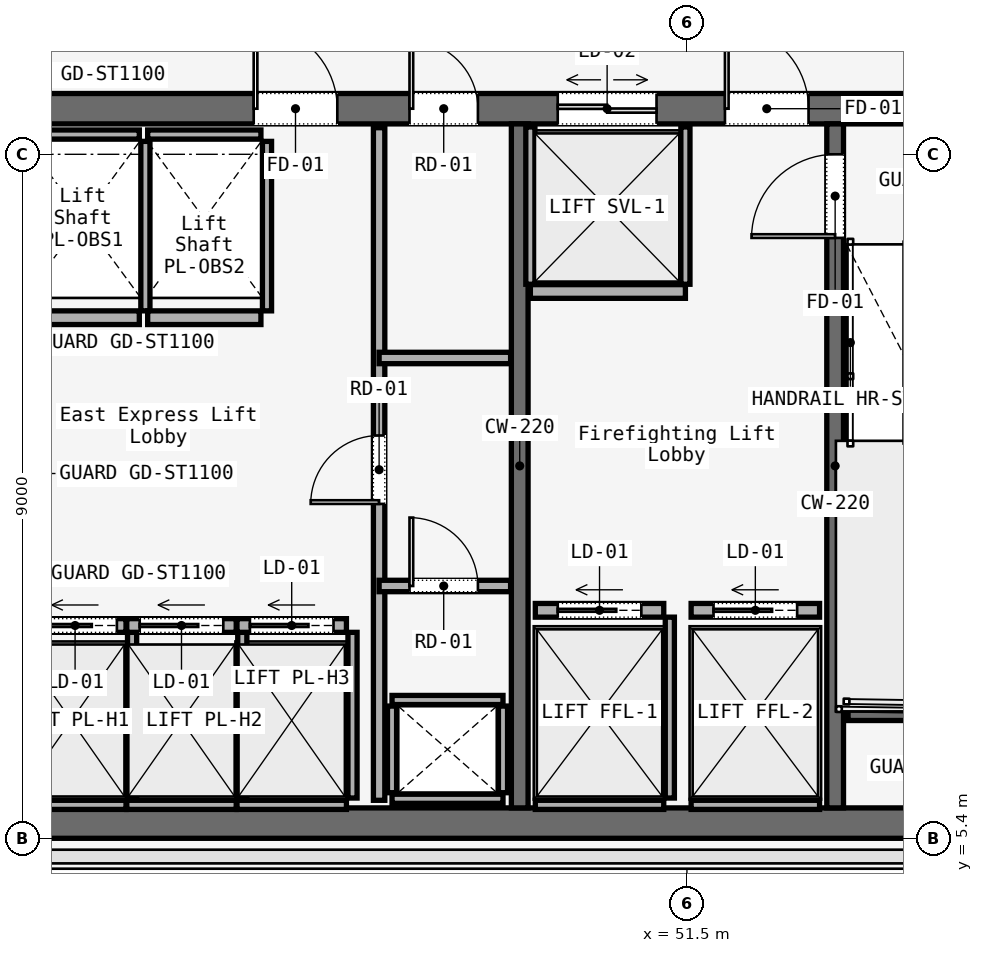
"""IFC4 building model, lengths in metres.
Left out: names, types, materials, properties, quantities, classifications, styles, units other than length and angle.
Written with IfcOpenShell. Run it as: python <this file> out.ifc"""

import sys

from ifc_helpers import new_model, si_unit, direction, frame, frame_2d, origin, place, context, subcontext, project, spatial, rectangle, extrude, element, fill, save


model = new_model("IFC4")
c1 = context("Model", 3, precision=1e-05, world=origin(), true_north=direction((0.0, 1.0)))
c2 = subcontext(c1, "Body", "Model", "MODEL_VIEW")
j1 = project(units=[si_unit("LENGTHUNIT", "METRE"), si_unit("PLANEANGLEUNIT", "RADIAN")], contexts=[c1])
p1 = place(None, origin())
s1 = spatial("IfcSite", under=j1, at=p1, CompositionType="ELEMENT")
p2 = place(p1, origin())
s2 = spatial("IfcBuilding", under=s1, at=p2, CompositionType="ELEMENT")
p3 = place(p2, frame((0.0, 0.0, 275.0)))
s3 = spatial("IfcBuildingStorey", under=s2, at=p3, CompositionType="ELEMENT", Elevation=275.0)
p4 = place(p3, frame((26.45, 15.0, 0.0), z_axis=(0.0, 0.0, 1.0), x_axis=(1.0, 0.0, 0.0)))
e1 = element("IfcWall", 1, at=p4, inside=s3, PredefinedType="SOLIDWALL", context=c2, shape_type="SweptSolid", body=[
    extrude(rectangle(XDim=31.1, YDim=0.4, at=frame_2d((15.55, 0.0))), origin(), (0.0, 0.0, 1.0), 3.52),
])
p5 = place(p4, frame((1.65, 0.0, 0.0)))
e2 = element("IfcOpeningElement", 2, at=p5, cuts=e1, PredefinedType="OPENING", context=c2, shape_type="SweptSolid", body=[
    extrude(rectangle(XDim=1.1, YDim=2.2, at=frame_2d((0.55, 1.1))), frame((0.0, 0.2, 0.0), z_axis=(0.0, -1.0, 0.0), x_axis=(1.0, 0.0, 0.0)), (0.0, 0.0, 1.0), 0.4),
])
p6 = place(p4, frame((13.65, 0.0, 0.0)))
e3 = element("IfcOpeningElement", 3, at=p6, cuts=e1, PredefinedType="OPENING", context=c2, shape_type="SweptSolid", body=[
    extrude(rectangle(XDim=1.1, YDim=2.2, at=frame_2d((0.55, 1.1))), frame((0.0, 0.2, 0.0), z_axis=(0.0, -1.0, 0.0), x_axis=(1.0, 0.0, 0.0)), (0.0, 0.0, 1.0), 0.4),
])
p7 = place(p4, frame((25.55, 0.0, 0.0)))
e4 = element("IfcOpeningElement", 4, at=p7, cuts=e1, PredefinedType="OPENING", context=c2, shape_type="SweptSolid", body=[
    extrude(rectangle(XDim=1.1, YDim=2.2, at=frame_2d((0.55, 1.1))), frame((0.0, 0.2, 0.0), z_axis=(0.0, -1.0, 0.0), x_axis=(1.0, 0.0, 0.0)), (0.0, 0.0, 1.0), 0.4),
])
p8 = place(p4, frame((19.35, 0.0, 0.0)))
e5 = element("IfcOpeningElement", 5, at=p8, cuts=e1, PredefinedType="OPENING", context=c2, shape_type="SweptSolid", body=[
    extrude(rectangle(XDim=1.1, YDim=2.2, at=frame_2d((0.55, 1.1))), frame((0.0, 0.2, 0.0), z_axis=(0.0, -1.0, 0.0), x_axis=(1.0, 0.0, 0.0)), (0.0, 0.0, 1.0), 0.4),
])
p9 = place(p4, frame((21.4, 0.0, 0.0)))
e6 = element("IfcOpeningElement", 6, at=p9, cuts=e1, PredefinedType="OPENING", context=c2, shape_type="SweptSolid", body=[
    extrude(rectangle(XDim=0.9, YDim=2.1, at=frame_2d((0.45, 1.05))), frame((0.0, 0.2, 0.0), z_axis=(0.0, -1.0, 0.0), x_axis=(1.0, 0.0, 0.0)), (0.0, 0.0, 1.0), 0.4),
])
p10 = place(p4, frame((5.54, 0.0, 0.0)))
e7 = element("IfcOpeningElement", 7, at=p10, cuts=e1, PredefinedType="OPENING", context=c2, shape_type="SweptSolid", body=[
    extrude(rectangle(XDim=0.95, YDim=2.2, at=frame_2d((0.475, 1.1))), frame((0.0, 0.2, 0.0), z_axis=(0.0, -1.0, 0.0), x_axis=(1.0, 0.0, 0.0)), (0.0, 0.0, 1.0), 0.4),
])
p11 = place(p4, frame((9.49, 0.0, 0.0)))
e8 = element("IfcOpeningElement", 8, at=p11, cuts=e1, PredefinedType="OPENING", context=c2, shape_type="SweptSolid", body=[
    extrude(rectangle(XDim=0.95, YDim=2.2, at=frame_2d((0.475, 1.1))), frame((0.0, 0.2, 0.0), z_axis=(0.0, -1.0, 0.0), x_axis=(1.0, 0.0, 0.0)), (0.0, 0.0, 1.0), 0.4),
])
p12 = place(p4, frame((23.35, 0.0, 0.0)))
e9 = element("IfcOpeningElement", 9, at=p12, cuts=e1, PredefinedType="OPENING", context=c2, shape_type="SweptSolid", body=[
    extrude(rectangle(XDim=1.3, YDim=2.3, at=frame_2d((0.65, 1.15))), frame((0.0, 0.2, 0.0), z_axis=(0.0, -1.0, 0.0), x_axis=(1.0, 0.0, 0.0)), (0.0, 0.0, 1.0), 0.4),
])
p13 = place(p3, frame((26.45, 5.6, 0.0), z_axis=(0.0, 0.0, 1.0), x_axis=(1.0, 0.0, 0.0)))
e10 = element("IfcWall", 10, at=p13, inside=s3, PredefinedType="SOLIDWALL", context=c2, shape_type="SweptSolid", body=[
    extrude(rectangle(XDim=31.1, YDim=0.4, at=frame_2d((15.55, 0.0))), origin(), (0.0, 0.0, 1.0), 3.52),
])
p14 = place(p3, frame((49.3, 5.8, 0.0), z_axis=(0.0, 0.0, 1.0), x_axis=(0.0, 1.0, 0.0)))
e11 = element("IfcWall", 11, at=p14, inside=s3, PredefinedType="SOLIDWALL", context=c2, shape_type="SweptSolid", body=[
    extrude(rectangle(XDim=9.0, YDim=0.22, at=frame_2d((4.5, 0.0))), origin(), (0.0, 0.0, 1.0), 3.52),
])
p15 = place(p3, frame((53.45, 5.8, 0.0), z_axis=(0.0, 0.0, 1.0), x_axis=(0.0, 1.0, 0.0)))
e12 = element("IfcWall", 12, at=p15, inside=s3, PredefinedType="SOLIDWALL", context=c2, shape_type="SweptSolid", body=[
    extrude(rectangle(XDim=9.0, YDim=0.22, at=frame_2d((4.5, 0.0))), origin(), (0.0, 0.0, 1.0), 3.52),
])
p16 = place(p15, frame((7.5, 0.0, 0.0)))
e13 = element("IfcOpeningElement", 13, at=p16, cuts=e12, PredefinedType="OPENING", context=c2, shape_type="SweptSolid", body=[
    extrude(rectangle(XDim=1.1, YDim=2.2, at=frame_2d((0.55, 1.1))), frame((0.0, 0.11, 0.0), z_axis=(0.0, -1.0, 0.0), x_axis=(1.0, 0.0, 0.0)), (0.0, 0.0, 1.0), 0.22),
])
p17 = place(p3, frame((53.62, 7.05, 0.0), z_axis=(0.0, 0.0, 1.0), x_axis=(1.0, 0.0, 0.0)))
e14 = element("IfcWall", 14, at=p17, inside=s3, PredefinedType="SOLIDWALL", context=c2, shape_type="SweptSolid", body=[
    extrude(rectangle(XDim=3.115, YDim=0.2, at=frame_2d((1.558, 0.0))), origin(), (0.0, 0.0, 1.0), 3.8),
])
for number, where, z_axis, x_axis in (
    (15, (47.62, 5.92, 0.0), (0.0, 0.0, 1.0), (1.0, 0.0, 0.0)),
    (16, (47.62, 7.22, 0.0), (0.0, 0.0, 1.0), (1.0, 0.0, 0.0)),
):
    element("IfcWall", number, at=place(p3, frame(where, z_axis=z_axis, x_axis=x_axis)), inside=s3, PredefinedType="SOLIDWALL", context=c2, shape_type="SweptSolid", body=[
        extrude(rectangle(XDim=1.46, YDim=0.12, at=frame_2d((0.73, 0.0))), origin(), (0.0, 0.0, 1.0), 2.95),
    ])
for number, where, z_axis, x_axis in (
    (17, (47.62, 6.0, 0.0), (0.0, 0.0, 1.0), (0.0, 1.0, 0.0)),
    (18, (49.08, 6.0, 0.0), (0.0, 0.0, 1.0), (0.0, 1.0, 0.0)),
):
    element("IfcWall", number, at=place(p3, frame(where, z_axis=z_axis, x_axis=x_axis)), inside=s3, PredefinedType="SOLIDWALL", context=c2, shape_type="SweptSolid", body=[
        extrude(rectangle(XDim=1.14, YDim=0.12, at=frame_2d((0.57, 0.0))), origin(), (0.0, 0.0, 1.0), 2.95),
    ])
p18 = place(p3, frame((47.45, 5.9, 0.0), z_axis=(0.0, 0.0, 1.0), x_axis=(0.0, 1.0, 0.0)))
e19 = element("IfcWall", 19, at=p18, inside=s3, PredefinedType="PARTITIONING", context=c2, shape_type="SweptSolid", body=[
    extrude(rectangle(XDim=8.85, YDim=0.15, at=frame_2d((4.425, 0.0))), origin(), (0.0, 0.0, 1.0), 2.95),
])
p19 = place(p18, frame((3.9, 0.0, 0.0)))
e20 = element("IfcOpeningElement", 20, at=p19, cuts=e19, PredefinedType="OPENING", context=c2, shape_type="SweptSolid", body=[
    extrude(rectangle(XDim=0.9, YDim=2.1, at=frame_2d((0.45, 1.05))), frame((0.0, 0.075, 0.0), z_axis=(0.0, -1.0, 0.0), x_axis=(1.0, 0.0, 0.0)), (0.0, 0.0, 1.0), 0.15),
])
p20 = place(p3, frame((47.45, 8.72, 0.0), z_axis=(0.0, 0.0, 1.0), x_axis=(1.0, 0.0, 0.0)))
e21 = element("IfcWall", 21, at=p20, inside=s3, PredefinedType="PARTITIONING", context=c2, shape_type="SweptSolid", body=[
    extrude(rectangle(XDim=1.73, YDim=0.15, at=frame_2d((0.865, 0.0))), origin(), (0.0, 0.0, 1.0), 2.95),
])
p21 = place(p20, frame((0.4, 0.0, 0.0)))
e22 = element("IfcOpeningElement", 22, at=p21, cuts=e21, PredefinedType="OPENING", context=c2, shape_type="SweptSolid", body=[
    extrude(rectangle(XDim=0.9, YDim=2.1, at=frame_2d((0.45, 1.05))), frame((0.0, 0.075, 0.0), z_axis=(0.0, -1.0, 0.0), x_axis=(1.0, 0.0, 0.0)), (0.0, 0.0, 1.0), 0.15),
])
p22 = place(p3, frame((47.45, 11.72, 0.0), z_axis=(0.0, 0.0, 1.0), x_axis=(1.0, 0.0, 0.0)))
e23 = element("IfcWall", 23, at=p22, inside=s3, PredefinedType="PARTITIONING", context=c2, shape_type="SweptSolid", body=[
    extrude(rectangle(XDim=1.73, YDim=0.15, at=frame_2d((0.865, 0.0))), origin(), (0.0, 0.0, 1.0), 2.95),
])
p23 = place(p3, frame((42.78, 8.2, 0.0), z_axis=(0.0, 0.0, 1.0), x_axis=(1.0, 0.0, 0.0)))
e24 = element("IfcWall", 24, at=p23, inside=s3, PredefinedType="SOLIDWALL", context=c2, shape_type="SweptSolid", body=[
    extrude(rectangle(XDim=1.34, YDim=0.18, at=frame_2d((0.67, 0.0))), origin(), (0.0, 0.0, 1.0), 2.95),
])
p24 = place(p23, frame((0.12, 0.0, 0.0)))
e25 = element("IfcOpeningElement", 25, at=p24, cuts=e24, PredefinedType="OPENING", context=c2, shape_type="SweptSolid", body=[
    extrude(rectangle(XDim=1.1, YDim=2.2, at=frame_2d((0.55, 1.1))), frame((0.0, 0.09, 0.0), z_axis=(0.0, -1.0, 0.0), x_axis=(1.0, 0.0, 0.0)), (0.0, 0.0, 1.0), 0.18),
])
p25 = place(p3, frame((42.78, 5.84, 0.0), z_axis=(0.0, 0.0, 1.0), x_axis=(1.0, 0.0, 0.0)))
e26 = element("IfcWall", 26, at=p25, inside=s3, PredefinedType="SOLIDWALL", context=c2, shape_type="SweptSolid", body=[
    extrude(rectangle(XDim=1.34, YDim=0.12, at=frame_2d((0.67, 0.0))), origin(), (0.0, 0.0, 1.0), 2.95),
])
p26 = place(p3, frame((44.2, 5.93, 0.0), z_axis=(0.0, 0.0, 1.0), x_axis=(0.0, 1.0, 0.0)))
e27 = element("IfcWall", 27, at=p26, inside=s3, PredefinedType="SOLIDWALL", context=c2, shape_type="SweptSolid", body=[
    extrude(rectangle(XDim=2.18, YDim=0.12, at=frame_2d((1.09, 0.0))), origin(), (0.0, 0.0, 1.0), 2.95),
])
p27 = place(p3, frame((44.13, 8.2, 0.0), z_axis=(0.0, 0.0, 1.0), x_axis=(1.0, 0.0, 0.0)))
e28 = element("IfcWall", 28, at=p27, inside=s3, PredefinedType="SOLIDWALL", context=c2, shape_type="SweptSolid", body=[
    extrude(rectangle(XDim=1.44, YDim=0.18, at=frame_2d((0.72, 0.0))), origin(), (0.0, 0.0, 1.0), 2.95),
])
p28 = place(p27, frame((0.17, 0.0, 0.0)))
e29 = element("IfcOpeningElement", 29, at=p28, cuts=e28, PredefinedType="OPENING", context=c2, shape_type="SweptSolid", body=[
    extrude(rectangle(XDim=1.1, YDim=2.2, at=frame_2d((0.55, 1.1))), frame((0.0, 0.09, 0.0), z_axis=(0.0, -1.0, 0.0), x_axis=(1.0, 0.0, 0.0)), (0.0, 0.0, 1.0), 0.18),
])
p29 = place(p3, frame((44.13, 5.84, 0.0), z_axis=(0.0, 0.0, 1.0), x_axis=(1.0, 0.0, 0.0)))
e30 = element("IfcWall", 30, at=p29, inside=s3, PredefinedType="SOLIDWALL", context=c2, shape_type="SweptSolid", body=[
    extrude(rectangle(XDim=1.44, YDim=0.12, at=frame_2d((0.72, 0.0))), origin(), (0.0, 0.0, 1.0), 2.95),
])
p30 = place(p3, frame((45.65, 5.93, 0.0), z_axis=(0.0, 0.0, 1.0), x_axis=(0.0, 1.0, 0.0)))
e31 = element("IfcWall", 31, at=p30, inside=s3, PredefinedType="SOLIDWALL", context=c2, shape_type="SweptSolid", body=[
    extrude(rectangle(XDim=2.18, YDim=0.12, at=frame_2d((1.09, 0.0))), origin(), (0.0, 0.0, 1.0), 2.95),
])
p31 = place(p3, frame((45.58, 8.2, 0.0), z_axis=(0.0, 0.0, 1.0), x_axis=(1.0, 0.0, 0.0)))
e32 = element("IfcWall", 32, at=p31, inside=s3, PredefinedType="SOLIDWALL", context=c2, shape_type="SweptSolid", body=[
    extrude(rectangle(XDim=1.44, YDim=0.18, at=frame_2d((0.72, 0.0))), origin(), (0.0, 0.0, 1.0), 2.95),
])
p32 = place(p31, frame((0.17, 0.0, 0.0)))
e33 = element("IfcOpeningElement", 33, at=p32, cuts=e32, PredefinedType="OPENING", context=c2, shape_type="SweptSolid", body=[
    extrude(rectangle(XDim=1.1, YDim=2.2, at=frame_2d((0.55, 1.1))), frame((0.0, 0.09, 0.0), z_axis=(0.0, -1.0, 0.0), x_axis=(1.0, 0.0, 0.0)), (0.0, 0.0, 1.0), 0.18),
])
p33 = place(p3, frame((45.58, 5.84, 0.0), z_axis=(0.0, 0.0, 1.0), x_axis=(1.0, 0.0, 0.0)))
e34 = element("IfcWall", 34, at=p33, inside=s3, PredefinedType="SOLIDWALL", context=c2, shape_type="SweptSolid", body=[
    extrude(rectangle(XDim=1.44, YDim=0.12, at=frame_2d((0.72, 0.0))), origin(), (0.0, 0.0, 1.0), 2.95),
])
p34 = place(p3, frame((47.1, 5.93, 0.0), z_axis=(0.0, 0.0, 1.0), x_axis=(0.0, 1.0, 0.0)))
e35 = element("IfcWall", 35, at=p34, inside=s3, PredefinedType="SOLIDWALL", context=c2, shape_type="SweptSolid", body=[
    extrude(rectangle(XDim=2.18, YDim=0.12, at=frame_2d((1.09, 0.0))), origin(), (0.0, 0.0, 1.0), 2.95),
])
p35 = place(p3, frame((42.805, 12.25, 0.0), z_axis=(0.0, 0.0, 1.0), x_axis=(1.0, 0.0, 0.0)))
e36 = element("IfcWall", 36, at=p35, inside=s3, PredefinedType="SOLIDWALL", context=c2, shape_type="SweptSolid", body=[
    extrude(rectangle(XDim=1.49, YDim=0.18, at=frame_2d((0.745, 0.0))), origin(), (0.0, 0.0, 1.0), 2.95),
])
p36 = place(p3, frame((42.805, 14.66, 0.0), z_axis=(0.0, 0.0, 1.0), x_axis=(1.0, 0.0, 0.0)))
e37 = element("IfcWall", 37, at=p36, inside=s3, PredefinedType="SOLIDWALL", context=c2, shape_type="SweptSolid", body=[
    extrude(rectangle(XDim=1.49, YDim=0.12, at=frame_2d((0.745, 0.0))), origin(), (0.0, 0.0, 1.0), 2.95),
])
p37 = place(p3, frame((44.375, 12.34, 0.0), z_axis=(0.0, 0.0, 1.0), x_axis=(0.0, 1.0, 0.0)))
e38 = element("IfcWall", 38, at=p37, inside=s3, PredefinedType="SOLIDWALL", context=c2, shape_type="SweptSolid", body=[
    extrude(rectangle(XDim=2.23, YDim=0.12, at=frame_2d((1.115, 0.0))), origin(), (0.0, 0.0, 1.0), 2.95),
])
p38 = place(p3, frame((44.405, 12.25, 0.0), z_axis=(0.0, 0.0, 1.0), x_axis=(1.0, 0.0, 0.0)))
e39 = element("IfcWall", 39, at=p38, inside=s3, PredefinedType="SOLIDWALL", context=c2, shape_type="SweptSolid", body=[
    extrude(rectangle(XDim=1.49, YDim=0.18, at=frame_2d((0.745, 0.0))), origin(), (0.0, 0.0, 1.0), 2.95),
])
p39 = place(p3, frame((44.405, 14.66, 0.0), z_axis=(0.0, 0.0, 1.0), x_axis=(1.0, 0.0, 0.0)))
e40 = element("IfcWall", 40, at=p39, inside=s3, PredefinedType="SOLIDWALL", context=c2, shape_type="SweptSolid", body=[
    extrude(rectangle(XDim=1.49, YDim=0.12, at=frame_2d((0.745, 0.0))), origin(), (0.0, 0.0, 1.0), 2.95),
])
p40 = place(p3, frame((45.975, 12.34, 0.0), z_axis=(0.0, 0.0, 1.0), x_axis=(0.0, 1.0, 0.0)))
e41 = element("IfcWall", 41, at=p40, inside=s3, PredefinedType="SOLIDWALL", context=c2, shape_type="SweptSolid", body=[
    extrude(rectangle(XDim=2.23, YDim=0.12, at=frame_2d((1.115, 0.0))), origin(), (0.0, 0.0, 1.0), 2.95),
])
p41 = place(p3, frame((49.505, 8.4, 0.0), z_axis=(0.0, 0.0, 1.0), x_axis=(1.0, 0.0, 0.0)))
e42 = element("IfcWall", 42, at=p41, inside=s3, PredefinedType="SOLIDWALL", context=c2, shape_type="SweptSolid", body=[
    extrude(rectangle(XDim=1.69, YDim=0.18, at=frame_2d((0.845, 0.0))), origin(), (0.0, 0.0, 1.0), 2.95),
])
p42 = place(p41, frame((0.295, 0.0, 0.0)))
e43 = element("IfcOpeningElement", 43, at=p42, cuts=e42, PredefinedType="OPENING", context=c2, shape_type="SweptSolid", body=[
    extrude(rectangle(XDim=1.1, YDim=2.2, at=frame_2d((0.55, 1.1))), frame((0.0, 0.09, 0.0), z_axis=(0.0, -1.0, 0.0), x_axis=(1.0, 0.0, 0.0)), (0.0, 0.0, 1.0), 0.18),
])
p43 = place(p3, frame((49.505, 5.84, 0.0), z_axis=(0.0, 0.0, 1.0), x_axis=(1.0, 0.0, 0.0)))
e44 = element("IfcWall", 44, at=p43, inside=s3, PredefinedType="SOLIDWALL", context=c2, shape_type="SweptSolid", body=[
    extrude(rectangle(XDim=1.69, YDim=0.12, at=frame_2d((0.845, 0.0))), origin(), (0.0, 0.0, 1.0), 2.95),
])
p44 = place(p3, frame((51.275, 5.93, 0.0), z_axis=(0.0, 0.0, 1.0), x_axis=(0.0, 1.0, 0.0)))
e45 = element("IfcWall", 45, at=p44, inside=s3, PredefinedType="SOLIDWALL", context=c2, shape_type="SweptSolid", body=[
    extrude(rectangle(XDim=2.38, YDim=0.12, at=frame_2d((1.19, 0.0))), origin(), (0.0, 0.0, 1.0), 2.95),
])
p45 = place(p3, frame((51.555, 8.4, 0.0), z_axis=(0.0, 0.0, 1.0), x_axis=(1.0, 0.0, 0.0)))
e46 = element("IfcWall", 46, at=p45, inside=s3, PredefinedType="SOLIDWALL", context=c2, shape_type="SweptSolid", body=[
    extrude(rectangle(XDim=1.69, YDim=0.18, at=frame_2d((0.845, 0.0))), origin(), (0.0, 0.0, 1.0), 2.95),
])
p46 = place(p45, frame((0.295, 0.0, 0.0)))
e47 = element("IfcOpeningElement", 47, at=p46, cuts=e46, PredefinedType="OPENING", context=c2, shape_type="SweptSolid", body=[
    extrude(rectangle(XDim=1.1, YDim=2.2, at=frame_2d((0.55, 1.1))), frame((0.0, 0.09, 0.0), z_axis=(0.0, -1.0, 0.0), x_axis=(1.0, 0.0, 0.0)), (0.0, 0.0, 1.0), 0.18),
])
p47 = place(p3, frame((51.555, 5.84, 0.0), z_axis=(0.0, 0.0, 1.0), x_axis=(1.0, 0.0, 0.0)))
e48 = element("IfcWall", 48, at=p47, inside=s3, PredefinedType="SOLIDWALL", context=c2, shape_type="SweptSolid", body=[
    extrude(rectangle(XDim=1.69, YDim=0.12, at=frame_2d((0.845, 0.0))), origin(), (0.0, 0.0, 1.0), 2.95),
])
p48 = place(p3, frame((49.44, 12.595, 0.0), z_axis=(0.0, 0.0, 1.0), x_axis=(1.0, 0.0, 0.0)))
e49 = element("IfcWall", 49, at=p48, inside=s3, PredefinedType="SOLIDWALL", context=c2, shape_type="SweptSolid", body=[
    extrude(rectangle(XDim=2.04, YDim=0.18, at=frame_2d((1.02, 0.0))), origin(), (0.0, 0.0, 1.0), 2.95),
])
for number, where, z_axis, x_axis in (
    (50, (49.44, 12.69, 0.0), (0.0, 0.0, 1.0), (0.0, 1.0, 0.0)),
    (51, (51.48, 12.69, 0.0), (0.0, 0.0, 1.0), (0.0, 1.0, 0.0)),
):
    element("IfcWall", number, at=place(p3, frame(where, z_axis=z_axis, x_axis=x_axis)), inside=s3, PredefinedType="SOLIDWALL", context=c2, shape_type="SweptSolid", body=[
        extrude(rectangle(XDim=2.07, YDim=0.12, at=frame_2d((1.035, 0.0))), origin(), (0.0, 0.0, 1.0), 2.95),
    ])
p49 = place(p7, origin())
e52 = element("IfcDoor", 52, at=p49, inside=s3, OperationType="SINGLE_SWING_RIGHT", PredefinedType="DOOR", context=c2, shape_type="SweptSolid", body=[
    extrude(rectangle(XDim=1.1, YDim=2.2, at=frame_2d((0.55, 1.1))), frame((0.0, 0.025, 0.0), z_axis=(0.0, -1.0, 0.0), x_axis=(1.0, 0.0, 0.0)), (0.0, 0.0, 1.0), 0.05),
])
fill(e4, e52)
p50 = place(p8, origin())
e53 = element("IfcDoor", 53, at=p50, inside=s3, OperationType="SINGLE_SWING_LEFT", PredefinedType="DOOR", context=c2, shape_type="SweptSolid", body=[
    extrude(rectangle(XDim=1.1, YDim=2.2, at=frame_2d((0.55, 1.1))), frame((0.0, 0.025, 0.0), z_axis=(0.0, -1.0, 0.0), x_axis=(1.0, 0.0, 0.0)), (0.0, 0.0, 1.0), 0.05),
])
fill(e5, e53)
p51 = place(p9, origin())
e54 = element("IfcDoor", 54, at=p51, inside=s3, OperationType="SINGLE_SWING_LEFT", PredefinedType="DOOR", context=c2, shape_type="SweptSolid", body=[
    extrude(rectangle(XDim=0.9, YDim=2.1, at=frame_2d((0.45, 1.05))), frame((0.0, 0.025, 0.0), z_axis=(0.0, -1.0, 0.0), x_axis=(1.0, 0.0, 0.0)), (0.0, 0.0, 1.0), 0.05),
])
fill(e6, e54)
p52 = place(p16, origin())
e55 = element("IfcDoor", 55, at=p52, inside=s3, OperationType="SINGLE_SWING_LEFT", PredefinedType="DOOR", context=c2, shape_type="SweptSolid", body=[
    extrude(rectangle(XDim=1.1, YDim=2.2, at=frame_2d((0.55, 1.1))), frame((0.0, 0.025, 0.0), z_axis=(0.0, -1.0, 0.0), x_axis=(1.0, 0.0, 0.0)), (0.0, 0.0, 1.0), 0.05),
])
fill(e13, e55)
p53 = place(p19, origin())
e56 = element("IfcDoor", 56, at=p53, inside=s3, OperationType="SINGLE_SWING_LEFT", PredefinedType="DOOR", context=c2, shape_type="SweptSolid", body=[
    extrude(rectangle(XDim=0.9, YDim=2.1, at=frame_2d((0.45, 1.05))), frame((0.0, 0.025, 0.0), z_axis=(0.0, -1.0, 0.0), x_axis=(1.0, 0.0, 0.0)), (0.0, 0.0, 1.0), 0.05),
])
fill(e20, e56)
p54 = place(p21, origin())
e57 = element("IfcDoor", 57, at=p54, inside=s3, OperationType="SINGLE_SWING_RIGHT", PredefinedType="DOOR", context=c2, shape_type="SweptSolid", body=[
    extrude(rectangle(XDim=0.9, YDim=2.1, at=frame_2d((0.45, 1.05))), frame((0.0, 0.025, 0.0), z_axis=(0.0, -1.0, 0.0), x_axis=(1.0, 0.0, 0.0)), (0.0, 0.0, 1.0), 0.05),
])
fill(e22, e57)
p55 = place(p24, origin())
e58 = element("IfcDoor", 58, at=p55, inside=s3, OperationType="SLIDING_TO_LEFT", PredefinedType="DOOR", context=c2, shape_type="SweptSolid", body=[
    extrude(rectangle(XDim=1.1, YDim=2.2, at=frame_2d((0.55, 1.1))), frame((0.0, 0.025, 0.0), z_axis=(0.0, -1.0, 0.0), x_axis=(1.0, 0.0, 0.0)), (0.0, 0.0, 1.0), 0.05),
])
fill(e25, e58)
p56 = place(p28, origin())
e59 = element("IfcDoor", 59, at=p56, inside=s3, OperationType="SLIDING_TO_LEFT", PredefinedType="DOOR", context=c2, shape_type="SweptSolid", body=[
    extrude(rectangle(XDim=1.1, YDim=2.2, at=frame_2d((0.55, 1.1))), frame((0.0, 0.025, 0.0), z_axis=(0.0, -1.0, 0.0), x_axis=(1.0, 0.0, 0.0)), (0.0, 0.0, 1.0), 0.05),
])
fill(e29, e59)
p57 = place(p32, origin())
e60 = element("IfcDoor", 60, at=p57, inside=s3, OperationType="SLIDING_TO_LEFT", PredefinedType="DOOR", context=c2, shape_type="SweptSolid", body=[
    extrude(rectangle(XDim=1.1, YDim=2.2, at=frame_2d((0.55, 1.1))), frame((0.0, 0.025, 0.0), z_axis=(0.0, -1.0, 0.0), x_axis=(1.0, 0.0, 0.0)), (0.0, 0.0, 1.0), 0.05),
])
fill(e33, e60)
p58 = place(p42, origin())
e61 = element("IfcDoor", 61, at=p58, inside=s3, OperationType="SLIDING_TO_LEFT", PredefinedType="DOOR", context=c2, shape_type="SweptSolid", body=[
    extrude(rectangle(XDim=1.1, YDim=2.2, at=frame_2d((0.55, 1.1))), frame((0.0, 0.025, 0.0), z_axis=(0.0, -1.0, 0.0), x_axis=(1.0, 0.0, 0.0)), (0.0, 0.0, 1.0), 0.05),
])
fill(e43, e61)
p59 = place(p46, origin())
e62 = element("IfcDoor", 62, at=p59, inside=s3, OperationType="SLIDING_TO_LEFT", PredefinedType="DOOR", context=c2, shape_type="SweptSolid", body=[
    extrude(rectangle(XDim=1.1, YDim=2.2, at=frame_2d((0.55, 1.1))), frame((0.0, 0.025, 0.0), z_axis=(0.0, -1.0, 0.0), x_axis=(1.0, 0.0, 0.0)), (0.0, 0.0, 1.0), 0.05),
])
fill(e47, e62)
p60 = place(p12, origin())
e63 = element("IfcDoor", 63, at=p60, inside=s3, OperationType="DOUBLE_DOOR_SLIDING", PredefinedType="DOOR", context=c2, shape_type="SweptSolid", body=[
    extrude(rectangle(XDim=1.3, YDim=2.3, at=frame_2d((0.65, 1.15))), frame((0.0, 0.025, 0.0), z_axis=(0.0, -1.0, 0.0), x_axis=(1.0, 0.0, 0.0)), (0.0, 0.0, 1.0), 0.05),
])
fill(e9, e63)
save(model, sys.argv[1])
